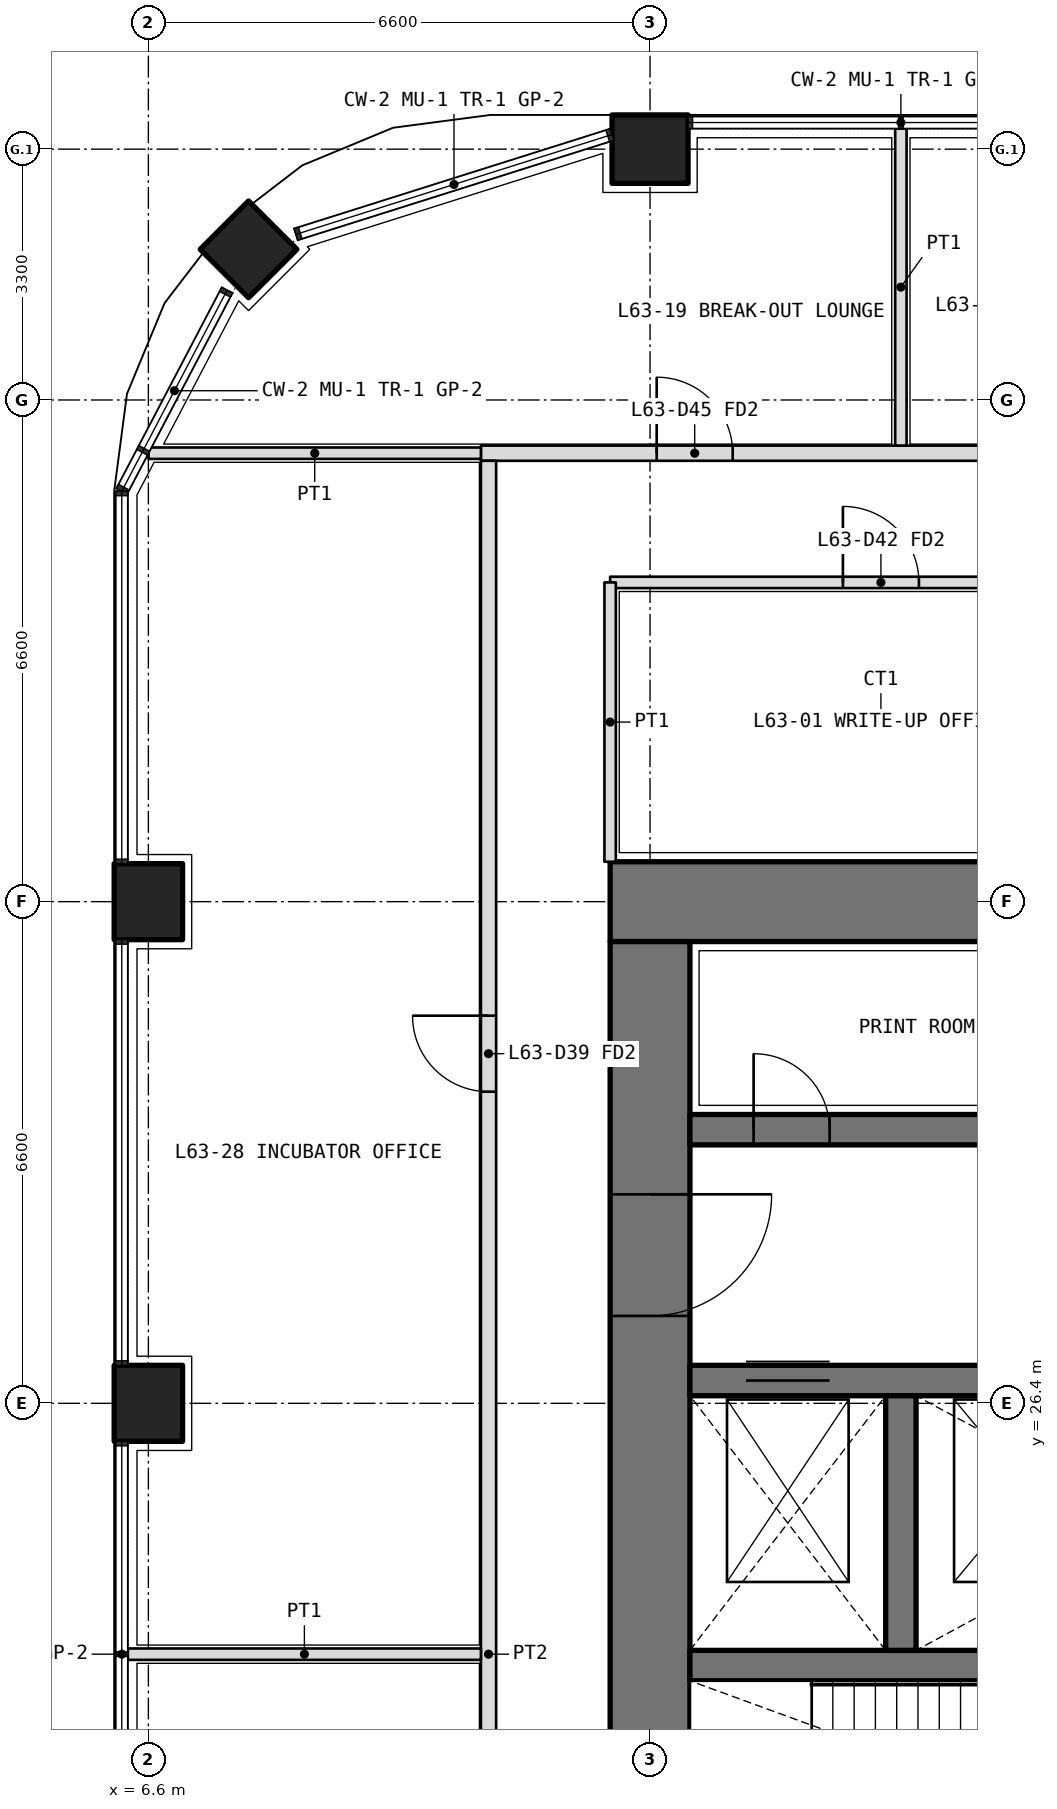
"""IFC4 building model, lengths in metres.
Left out: names, types, materials, properties, quantities, classifications, styles, units other than length and angle.
Written with IfcOpenShell. Run it as: python <this file> out.ifc"""

import sys

from ifc_helpers import new_model, si_unit, direction, frame, frame_2d, origin, origin_2d, place, context, subcontext, project, spatial, rectangle, extrude, element, fill, save


model = new_model("IFC4")
c1 = context("Model", 3, precision=1e-05, world=origin(), true_north=direction((0.0, 1.0)))
c2 = subcontext(c1, "Body", "Model", "MODEL_VIEW")
j1 = project(units=[si_unit("LENGTHUNIT", "METRE"), si_unit("PLANEANGLEUNIT", "RADIAN")], contexts=[c1])
p1 = place(None, origin())
s1 = spatial("IfcSite", under=j1, at=p1, CompositionType="ELEMENT")
p2 = place(p1, origin())
s2 = spatial("IfcBuilding", under=s1, at=p2, CompositionType="ELEMENT")
p3 = place(p2, frame((0.0, 0.0, 275.4)))
s3 = spatial("IfcBuildingStorey", under=s2, at=p3, CompositionType="ELEMENT", Elevation=275.4)
p4 = place(p3, frame((7.918, 41.582, 0.0), z_axis=(0.0, 0.0, 1.0), x_axis=(0.707106781187, 0.707106781187, 0.0)))
e1 = element("IfcColumn", 1, at=p4, inside=s3, PredefinedType="COLUMN", context=c2, shape_type="SweptSolid", body=[
    extrude(rectangle(XDim=0.9, YDim=0.9, at=origin_2d()), origin(), (0.0, 0.0, 1.0), 4.2),
])
for number, where, z_axis, x_axis in (
    (2, (6.6, 26.4, 0.0), (0.0, 0.0, 1.0), (0.0, 1.0, 0.0)),
    (3, (6.6, 33.0, 0.0), (0.0, 0.0, 1.0), (0.0, 1.0, 0.0)),
    (4, (13.2, 42.9, 0.0), (0.0, 0.0, 1.0), (1.0, 0.0, 0.0)),
):
    element("IfcColumn", number, at=place(p3, frame(where, z_axis=z_axis, x_axis=x_axis)), inside=s3, PredefinedType="COLUMN", context=c2, shape_type="SweptSolid", body=[
        extrude(rectangle(XDim=1.0, YDim=0.9, at=origin_2d()), origin(), (0.0, 0.0, 1.0), 4.2),
    ])
p5 = place(p3, frame((40.125, 33.0, 0.0), z_axis=(0.0, 0.0, 1.0), x_axis=(-1.0, 0.0, 0.0)))
e5 = element("IfcWall", 5, at=p5, inside=s3, PredefinedType="SHEAR", context=c2, shape_type="SweptSolid", body=[
    extrude(rectangle(XDim=27.45, YDim=1.05, at=frame_2d((13.725, 0.0))), origin(), (0.0, 0.0, 1.0), 4.2),
])
p6 = place(p3, frame((13.2, 32.475, 0.0), z_axis=(0.0, 0.0, 1.0), x_axis=(0.0, -1.0, 0.0)))
e6 = element("IfcWall", 6, at=p6, inside=s3, PredefinedType="SHEAR", context=c2, shape_type="SweptSolid", body=[
    extrude(rectangle(XDim=18.75, YDim=1.05, at=frame_2d((9.375, 0.0))), origin(), (0.0, 0.0, 1.0), 4.2),
])
p7 = place(p6, frame((14.125, 0.0, 0.0)))
e7 = element("IfcOpeningElement", 7, at=p7, cuts=e6, PredefinedType="OPENING", context=c2, shape_type="SweptSolid", body=[
    extrude(rectangle(XDim=1.6, YDim=2.1, at=frame_2d((0.8, 1.05))), frame((0.0, 0.535, 0.0), z_axis=(0.0, -1.0, 0.0), x_axis=(1.0, 0.0, 0.0)), (0.0, 0.0, 1.0), 1.07),
])
p8 = place(p6, frame((3.325, 0.0, 0.0)))
e8 = element("IfcOpeningElement", 8, at=p8, cuts=e6, PredefinedType="OPENING", context=c2, shape_type="SweptSolid", body=[
    extrude(rectangle(XDim=1.6, YDim=2.1, at=frame_2d((0.8, 1.05))), frame((0.0, 0.535, 0.0), z_axis=(0.0, -1.0, 0.0), x_axis=(1.0, 0.0, 0.0)), (0.0, 0.0, 1.0), 1.07),
])
p9 = place(p3, frame((13.725, 22.95, 0.0), z_axis=(0.0, 0.0, 1.0), x_axis=(1.0, 0.0, 0.0)))
e9 = element("IfcWall", 9, at=p9, inside=s3, PredefinedType="SHEAR", context=c2, shape_type="SweptSolid", body=[
    extrude(rectangle(XDim=25.35, YDim=0.4, at=frame_2d((12.675, 0.0))), origin(), (0.0, 0.0, 1.0), 4.2),
])
p10 = place(p3, frame((13.725, 26.7, 0.0), z_axis=(0.0, 0.0, 1.0), x_axis=(1.0, 0.0, 0.0)))
e10 = element("IfcWall", 10, at=p10, inside=s3, PredefinedType="SHEAR", context=c2, shape_type="SweptSolid", body=[
    extrude(rectangle(XDim=25.35, YDim=0.4, at=frame_2d((12.675, 0.0))), origin(), (0.0, 0.0, 1.0), 4.2),
])
p11 = place(p10, frame((23.95, 0.0, 0.0)))
e11 = element("IfcOpeningElement", 11, at=p11, cuts=e10, PredefinedType="OPENING", context=c2, shape_type="SweptSolid", body=[
    extrude(rectangle(XDim=1.2, YDim=2.1, at=frame_2d((0.6, 1.05))), frame((0.0, 0.21, 0.0), z_axis=(0.0, -1.0, 0.0), x_axis=(1.0, 0.0, 0.0)), (0.0, 0.0, 1.0), 0.42),
])
p12 = place(p10, frame((0.738, 0.0, 0.0)))
e12 = element("IfcOpeningElement", 12, at=p12, cuts=e10, PredefinedType="OPENING", context=c2, shape_type="SweptSolid", body=[
    extrude(rectangle(XDim=1.1, YDim=2.1, at=frame_2d((0.55, 1.05))), frame((0.0, 0.21, 0.0), z_axis=(0.0, -1.0, 0.0), x_axis=(1.0, 0.0, 0.0)), (0.0, 0.0, 1.0), 0.42),
])
p13 = place(p10, frame((3.925, 0.0, 0.0)))
e13 = element("IfcOpeningElement", 13, at=p13, cuts=e10, PredefinedType="OPENING", context=c2, shape_type="SweptSolid", body=[
    extrude(rectangle(XDim=1.1, YDim=2.1, at=frame_2d((0.55, 1.05))), frame((0.0, 0.21, 0.0), z_axis=(0.0, -1.0, 0.0), x_axis=(1.0, 0.0, 0.0)), (0.0, 0.0, 1.0), 0.42),
])
p14 = place(p10, frame((7.175, 0.0, 0.0)))
e14 = element("IfcOpeningElement", 14, at=p14, cuts=e10, PredefinedType="OPENING", context=c2, shape_type="SweptSolid", body=[
    extrude(rectangle(XDim=1.1, YDim=2.1, at=frame_2d((0.55, 1.05))), frame((0.0, 0.21, 0.0), z_axis=(0.0, -1.0, 0.0), x_axis=(1.0, 0.0, 0.0)), (0.0, 0.0, 1.0), 0.42),
])
p15 = place(p10, frame((10.425, 0.0, 0.0)))
e15 = element("IfcOpeningElement", 15, at=p15, cuts=e10, PredefinedType="OPENING", context=c2, shape_type="SweptSolid", body=[
    extrude(rectangle(XDim=1.1, YDim=2.1, at=frame_2d((0.55, 1.05))), frame((0.0, 0.21, 0.0), z_axis=(0.0, -1.0, 0.0), x_axis=(1.0, 0.0, 0.0)), (0.0, 0.0, 1.0), 0.42),
])
p16 = place(p10, frame((13.775, 0.0, 0.0)))
e16 = element("IfcOpeningElement", 16, at=p16, cuts=e10, PredefinedType="OPENING", context=c2, shape_type="SweptSolid", body=[
    extrude(rectangle(XDim=1.1, YDim=2.1, at=frame_2d((0.55, 1.05))), frame((0.0, 0.21, 0.0), z_axis=(0.0, -1.0, 0.0), x_axis=(1.0, 0.0, 0.0)), (0.0, 0.0, 1.0), 0.42),
])
p17 = place(p3, frame((13.725, 30.0, 0.0), z_axis=(0.0, 0.0, 1.0), x_axis=(1.0, 0.0, 0.0)))
e17 = element("IfcWall", 17, at=p17, inside=s3, PredefinedType="SHEAR", context=c2, shape_type="SweptSolid", body=[
    extrude(rectangle(XDim=25.35, YDim=0.4, at=frame_2d((12.675, 0.0))), origin(), (0.0, 0.0, 1.0), 4.2),
])
p18 = place(p17, frame((0.837, 0.0, 0.0)))
e18 = element("IfcOpeningElement", 18, at=p18, cuts=e17, PredefinedType="OPENING", context=c2, shape_type="SweptSolid", body=[
    extrude(rectangle(XDim=1.0, YDim=2.1, at=frame_2d((0.5, 1.05))), frame((0.0, 0.21, 0.0), z_axis=(0.0, -1.0, 0.0), x_axis=(1.0, 0.0, 0.0)), (0.0, 0.0, 1.0), 0.42),
])
p19 = place(p17, frame((3.925, 0.0, 0.0)))
e19 = element("IfcOpeningElement", 19, at=p19, cuts=e17, PredefinedType="OPENING", context=c2, shape_type="SweptSolid", body=[
    extrude(rectangle(XDim=1.0, YDim=2.1, at=frame_2d((0.5, 1.05))), frame((0.0, 0.21, 0.0), z_axis=(0.0, -1.0, 0.0), x_axis=(1.0, 0.0, 0.0)), (0.0, 0.0, 1.0), 0.42),
])
p20 = place(p17, frame((7.225, 0.0, 0.0)))
e20 = element("IfcOpeningElement", 20, at=p20, cuts=e17, PredefinedType="OPENING", context=c2, shape_type="SweptSolid", body=[
    extrude(rectangle(XDim=1.0, YDim=2.1, at=frame_2d((0.5, 1.05))), frame((0.0, 0.21, 0.0), z_axis=(0.0, -1.0, 0.0), x_axis=(1.0, 0.0, 0.0)), (0.0, 0.0, 1.0), 0.42),
])
p21 = place(p17, frame((10.525, 0.0, 0.0)))
e21 = element("IfcOpeningElement", 21, at=p21, cuts=e17, PredefinedType="OPENING", context=c2, shape_type="SweptSolid", body=[
    extrude(rectangle(XDim=1.0, YDim=2.1, at=frame_2d((0.5, 1.05))), frame((0.0, 0.21, 0.0), z_axis=(0.0, -1.0, 0.0), x_axis=(1.0, 0.0, 0.0)), (0.0, 0.0, 1.0), 0.42),
])
p22 = place(p17, frame((13.775, 0.0, 0.0)))
e22 = element("IfcOpeningElement", 22, at=p22, cuts=e17, PredefinedType="OPENING", context=c2, shape_type="SweptSolid", body=[
    extrude(rectangle(XDim=1.1, YDim=2.1, at=frame_2d((0.55, 1.05))), frame((0.0, 0.21, 0.0), z_axis=(0.0, -1.0, 0.0), x_axis=(1.0, 0.0, 0.0)), (0.0, 0.0, 1.0), 0.42),
])
p23 = place(p17, frame((17.075, 0.0, 0.0)))
e23 = element("IfcOpeningElement", 23, at=p23, cuts=e17, PredefinedType="OPENING", context=c2, shape_type="SweptSolid", body=[
    extrude(rectangle(XDim=1.1, YDim=2.1, at=frame_2d((0.55, 1.05))), frame((0.0, 0.21, 0.0), z_axis=(0.0, -1.0, 0.0), x_axis=(1.0, 0.0, 0.0)), (0.0, 0.0, 1.0), 0.42),
])
p24 = place(p17, frame((20.375, 0.0, 0.0)))
e24 = element("IfcOpeningElement", 24, at=p24, cuts=e17, PredefinedType="OPENING", context=c2, shape_type="SweptSolid", body=[
    extrude(rectangle(XDim=1.1, YDim=2.1, at=frame_2d((0.55, 1.05))), frame((0.0, 0.21, 0.0), z_axis=(0.0, -1.0, 0.0), x_axis=(1.0, 0.0, 0.0)), (0.0, 0.0, 1.0), 0.42),
])
p25 = place(p17, frame((23.462, 0.0, 0.0)))
e25 = element("IfcOpeningElement", 25, at=p25, cuts=e17, PredefinedType="OPENING", context=c2, shape_type="SweptSolid", body=[
    extrude(rectangle(XDim=1.1, YDim=2.1, at=frame_2d((0.55, 1.05))), frame((0.0, 0.21, 0.0), z_axis=(0.0, -1.0, 0.0), x_axis=(1.0, 0.0, 0.0)), (0.0, 0.0, 1.0), 0.42),
])
p26 = place(p3, frame((16.5, 23.15, 0.0), z_axis=(0.0, 0.0, 1.0), x_axis=(0.0, 1.0, 0.0)))
e26 = element("IfcWall", 26, at=p26, inside=s3, PredefinedType="SHEAR", context=c2, shape_type="SweptSolid", body=[
    extrude(rectangle(XDim=3.35, YDim=0.4, at=frame_2d((1.675, 0.0))), origin(), (0.0, 0.0, 1.0), 4.2),
])
p27 = place(p3, frame((12.675, 37.2, 0.0), z_axis=(0.0, 0.0, 1.0), x_axis=(1.0, 0.0, 0.0)))
e27 = element("IfcWall", 27, at=p27, inside=s3, PredefinedType="PARTITIONING", context=c2, shape_type="SweptSolid", body=[
    extrude(rectangle(XDim=27.45, YDim=0.15, at=frame_2d((13.725, 0.0))), origin(), (0.0, 0.0, 1.0), 3.0),
])
p28 = place(p27, frame((3.062, 0.0, 0.0)))
e28 = element("IfcOpeningElement", 28, at=p28, cuts=e27, PredefinedType="OPENING", context=c2, shape_type="SweptSolid", body=[
    extrude(rectangle(XDim=1.0, YDim=2.1, at=frame_2d((0.5, 1.05))), frame((0.0, 0.085, 0.0), z_axis=(0.0, -1.0, 0.0), x_axis=(1.0, 0.0, 0.0)), (0.0, 0.0, 1.0), 0.17),
])
p29 = place(p27, frame((13.225, 0.0, 0.0)))
e29 = element("IfcOpeningElement", 29, at=p29, cuts=e27, PredefinedType="OPENING", context=c2, shape_type="SweptSolid", body=[
    extrude(rectangle(XDim=1.0, YDim=2.1, at=frame_2d((0.5, 1.05))), frame((0.0, 0.085, 0.0), z_axis=(0.0, -1.0, 0.0), x_axis=(1.0, 0.0, 0.0)), (0.0, 0.0, 1.0), 0.17),
])
p30 = place(p27, frame((23.387, 0.0, 0.0)))
e30 = element("IfcOpeningElement", 30, at=p30, cuts=e27, PredefinedType="OPENING", context=c2, shape_type="SweptSolid", body=[
    extrude(rectangle(XDim=1.0, YDim=2.1, at=frame_2d((0.5, 1.05))), frame((0.0, 0.085, 0.0), z_axis=(0.0, -1.0, 0.0), x_axis=(1.0, 0.0, 0.0)), (0.0, 0.0, 1.0), 0.17),
])
p31 = place(p3, frame((12.675, 33.525, 0.0), z_axis=(0.0, 0.0, 1.0), x_axis=(0.0, 1.0, 0.0)))
e31 = element("IfcWall", 31, at=p31, inside=s3, PredefinedType="PARTITIONING", context=c2, shape_type="SweptSolid", body=[
    extrude(rectangle(XDim=3.675, YDim=0.15, at=frame_2d((1.837, 0.0))), origin(), (0.0, 0.0, 1.0), 3.0),
])
p32 = place(p3, frame((10.975, 38.9, 0.0), z_axis=(0.0, 0.0, 1.0), x_axis=(1.0, 0.0, 0.0)))
e32 = element("IfcWall", 32, at=p32, inside=s3, PredefinedType="PARTITIONING", context=c2, shape_type="SweptSolid", body=[
    extrude(rectangle(XDim=30.85, YDim=0.2, at=frame_2d((15.425, 0.0))), origin(), (0.0, 0.0, 1.0), 3.0),
])
p33 = place(p32, frame((2.312, 0.0, 0.0)))
e33 = element("IfcOpeningElement", 33, at=p33, cuts=e32, PredefinedType="OPENING", context=c2, shape_type="SweptSolid", body=[
    extrude(rectangle(XDim=1.0, YDim=2.1, at=frame_2d((0.5, 1.05))), frame((0.0, 0.11, 0.0), z_axis=(0.0, -1.0, 0.0), x_axis=(1.0, 0.0, 0.0)), (0.0, 0.0, 1.0), 0.22),
])
p34 = place(p32, frame((7.125, 0.0, 0.0)))
e34 = element("IfcOpeningElement", 34, at=p34, cuts=e32, PredefinedType="OPENING", context=c2, shape_type="SweptSolid", body=[
    extrude(rectangle(XDim=1.0, YDim=2.1, at=frame_2d((0.5, 1.05))), frame((0.0, 0.11, 0.0), z_axis=(0.0, -1.0, 0.0), x_axis=(1.0, 0.0, 0.0)), (0.0, 0.0, 1.0), 0.22),
])
p35 = place(p32, frame((10.425, 0.0, 0.0)))
e35 = element("IfcOpeningElement", 35, at=p35, cuts=e32, PredefinedType="OPENING", context=c2, shape_type="SweptSolid", body=[
    extrude(rectangle(XDim=1.0, YDim=2.1, at=frame_2d((0.5, 1.05))), frame((0.0, 0.11, 0.0), z_axis=(0.0, -1.0, 0.0), x_axis=(1.0, 0.0, 0.0)), (0.0, 0.0, 1.0), 0.22),
])
p36 = place(p32, frame((13.275, 0.0, 0.0)))
e36 = element("IfcOpeningElement", 36, at=p36, cuts=e32, PredefinedType="OPENING", context=c2, shape_type="SweptSolid", body=[
    extrude(rectangle(XDim=1.0, YDim=2.1, at=frame_2d((0.5, 1.05))), frame((0.0, 0.11, 0.0), z_axis=(0.0, -1.0, 0.0), x_axis=(1.0, 0.0, 0.0)), (0.0, 0.0, 1.0), 0.22),
])
p37 = place(p32, frame((22.587, 0.0, 0.0)))
e37 = element("IfcOpeningElement", 37, at=p37, cuts=e32, PredefinedType="OPENING", context=c2, shape_type="SweptSolid", body=[
    extrude(rectangle(XDim=1.0, YDim=2.1, at=frame_2d((0.5, 1.05))), frame((0.0, 0.11, 0.0), z_axis=(0.0, -1.0, 0.0), x_axis=(1.0, 0.0, 0.0)), (0.0, 0.0, 1.0), 0.22),
])
p38 = place(p3, frame((11.075, 7.4, 0.0), z_axis=(0.0, 0.0, 1.0), x_axis=(0.0, 1.0, 0.0)))
e38 = element("IfcWall", 38, at=p38, inside=s3, PredefinedType="PARTITIONING", context=c2, shape_type="SweptSolid", body=[
    extrude(rectangle(XDim=31.4, YDim=0.2, at=frame_2d((15.7, 0.0))), origin(), (0.0, 0.0, 1.0), 3.0),
])
p39 = place(p38, frame((2.35, 0.0, 0.0)))
e39 = element("IfcOpeningElement", 39, at=p39, cuts=e38, PredefinedType="OPENING", context=c2, shape_type="SweptSolid", body=[
    extrude(rectangle(XDim=1.0, YDim=2.1, at=frame_2d((0.5, 1.05))), frame((0.0, 0.11, 0.0), z_axis=(0.0, -1.0, 0.0), x_axis=(1.0, 0.0, 0.0)), (0.0, 0.0, 1.0), 0.22),
])
p40 = place(p38, frame((6.35, 0.0, 0.0)))
e40 = element("IfcOpeningElement", 40, at=p40, cuts=e38, PredefinedType="OPENING", context=c2, shape_type="SweptSolid", body=[
    extrude(rectangle(XDim=1.0, YDim=2.1, at=frame_2d((0.5, 1.05))), frame((0.0, 0.11, 0.0), z_axis=(0.0, -1.0, 0.0), x_axis=(1.0, 0.0, 0.0)), (0.0, 0.0, 1.0), 0.22),
])
p41 = place(p38, frame((9.45, 0.0, 0.0)))
e41 = element("IfcOpeningElement", 41, at=p41, cuts=e38, PredefinedType="OPENING", context=c2, shape_type="SweptSolid", body=[
    extrude(rectangle(XDim=0.9, YDim=2.1, at=frame_2d((0.45, 1.05))), frame((0.0, 0.11, 0.0), z_axis=(0.0, -1.0, 0.0), x_axis=(1.0, 0.0, 0.0)), (0.0, 0.0, 1.0), 0.22),
])
p42 = place(p38, frame((13.35, 0.0, 0.0)))
e42 = element("IfcOpeningElement", 42, at=p42, cuts=e38, PredefinedType="OPENING", context=c2, shape_type="SweptSolid", body=[
    extrude(rectangle(XDim=0.9, YDim=2.1, at=frame_2d((0.45, 1.05))), frame((0.0, 0.11, 0.0), z_axis=(0.0, -1.0, 0.0), x_axis=(1.0, 0.0, 0.0)), (0.0, 0.0, 1.0), 0.22),
])
p43 = place(p38, frame((23.1, 0.0, 0.0)))
e43 = element("IfcOpeningElement", 43, at=p43, cuts=e38, PredefinedType="OPENING", context=c2, shape_type="SweptSolid", body=[
    extrude(rectangle(XDim=1.0, YDim=2.1, at=frame_2d((0.5, 1.05))), frame((0.0, 0.11, 0.0), z_axis=(0.0, -1.0, 0.0), x_axis=(1.0, 0.0, 0.0)), (0.0, 0.0, 1.0), 0.22),
])
p44 = place(p3, frame((6.603, 38.9, 0.0), z_axis=(0.0, 0.0, 1.0), x_axis=(1.0, 0.0, 0.0)))
e44 = element("IfcWall", 44, at=p44, inside=s3, PredefinedType="PARTITIONING", context=c2, shape_type="SweptSolid", body=[
    extrude(rectangle(XDim=4.373, YDim=0.15, at=frame_2d((2.186, 0.0))), origin(), (0.0, 0.0, 1.0), 2.7),
])
p45 = place(p3, frame((16.5, 43.17, 0.0), z_axis=(0.0, 0.0, 1.0), x_axis=(0.0, -1.0, 0.0)))
e45 = element("IfcWall", 45, at=p45, inside=s3, PredefinedType="PARTITIONING", context=c2, shape_type="SweptSolid", body=[
    extrude(rectangle(XDim=4.17, YDim=0.15, at=frame_2d((2.085, 0.0))), origin(), (0.0, 0.0, 1.0), 2.7),
])
p46 = place(p3, frame((6.33, 23.1, 0.0), z_axis=(0.0, 0.0, 1.0), x_axis=(1.0, 0.0, 0.0)))
e46 = element("IfcWall", 46, at=p46, inside=s3, PredefinedType="PARTITIONING", context=c2, shape_type="SweptSolid", body=[
    extrude(rectangle(XDim=4.645, YDim=0.15, at=frame_2d((2.323, 0.0))), origin(), (0.0, 0.0, 1.0), 2.7),
])
p47 = place(p28, origin())
e47 = element("IfcDoor", 47, at=p47, inside=s3, OperationType="SINGLE_SWING_LEFT", PredefinedType="DOOR", context=c2, shape_type="SweptSolid", body=[
    extrude(rectangle(XDim=1.0, YDim=2.1, at=frame_2d((0.5, 1.05))), frame((0.0, 0.025, 0.0), z_axis=(0.0, -1.0, 0.0), x_axis=(1.0, 0.0, 0.0)), (0.0, 0.0, 1.0), 0.05),
])
fill(e28, e47)
p48 = place(p33, origin())
e48 = element("IfcDoor", 48, at=p48, inside=s3, OperationType="SINGLE_SWING_LEFT", PredefinedType="DOOR", context=c2, shape_type="SweptSolid", body=[
    extrude(rectangle(XDim=1.0, YDim=2.1, at=frame_2d((0.5, 1.05))), frame((0.0, 0.025, 0.0), z_axis=(0.0, -1.0, 0.0), x_axis=(1.0, 0.0, 0.0)), (0.0, 0.0, 1.0), 0.05),
])
fill(e33, e48)
p49 = place(p43, origin())
e49 = element("IfcDoor", 49, at=p49, inside=s3, OperationType="SINGLE_SWING_RIGHT", PredefinedType="DOOR", context=c2, shape_type="SweptSolid", body=[
    extrude(rectangle(XDim=1.0, YDim=2.1, at=frame_2d((0.5, 1.05))), frame((0.0, 0.025, 0.0), z_axis=(0.0, -1.0, 0.0), x_axis=(1.0, 0.0, 0.0)), (0.0, 0.0, 1.0), 0.05),
])
fill(e43, e49)
p50 = place(p18, origin())
e50 = element("IfcDoor", 50, at=p50, inside=s3, OperationType="SINGLE_SWING_LEFT", PredefinedType="DOOR", context=c2, shape_type="SweptSolid", body=[
    extrude(rectangle(XDim=1.0, YDim=2.1, at=frame_2d((0.5, 1.05))), frame((0.0, 0.025, 0.0), z_axis=(0.0, -1.0, 0.0), x_axis=(1.0, 0.0, 0.0)), (0.0, 0.0, 1.0), 0.05),
])
fill(e18, e50)
p51 = place(p8, origin())
e51 = element("IfcDoor", 51, at=p51, inside=s3, OperationType="DOUBLE_DOOR_DOUBLE_SWING", PredefinedType="DOOR", context=c2, shape_type="SweptSolid", body=[
    extrude(rectangle(XDim=1.6, YDim=2.1, at=frame_2d((0.8, 1.05))), frame((0.0, 0.025, 0.0), z_axis=(0.0, -1.0, 0.0), x_axis=(1.0, 0.0, 0.0)), (0.0, 0.0, 1.0), 0.05),
])
fill(e8, e51)
p52 = place(p12, origin())
e52 = element("IfcDoor", 52, at=p52, inside=s3, OperationType="DOUBLE_DOOR_SLIDING", PredefinedType="DOOR", context=c2, shape_type="SweptSolid", body=[
    extrude(rectangle(XDim=1.1, YDim=2.1, at=frame_2d((0.55, 1.05))), frame((0.0, 0.025, 0.0), z_axis=(0.0, -1.0, 0.0), x_axis=(1.0, 0.0, 0.0)), (0.0, 0.0, 1.0), 0.05),
])
fill(e12, e52)
save(model, sys.argv[1])
